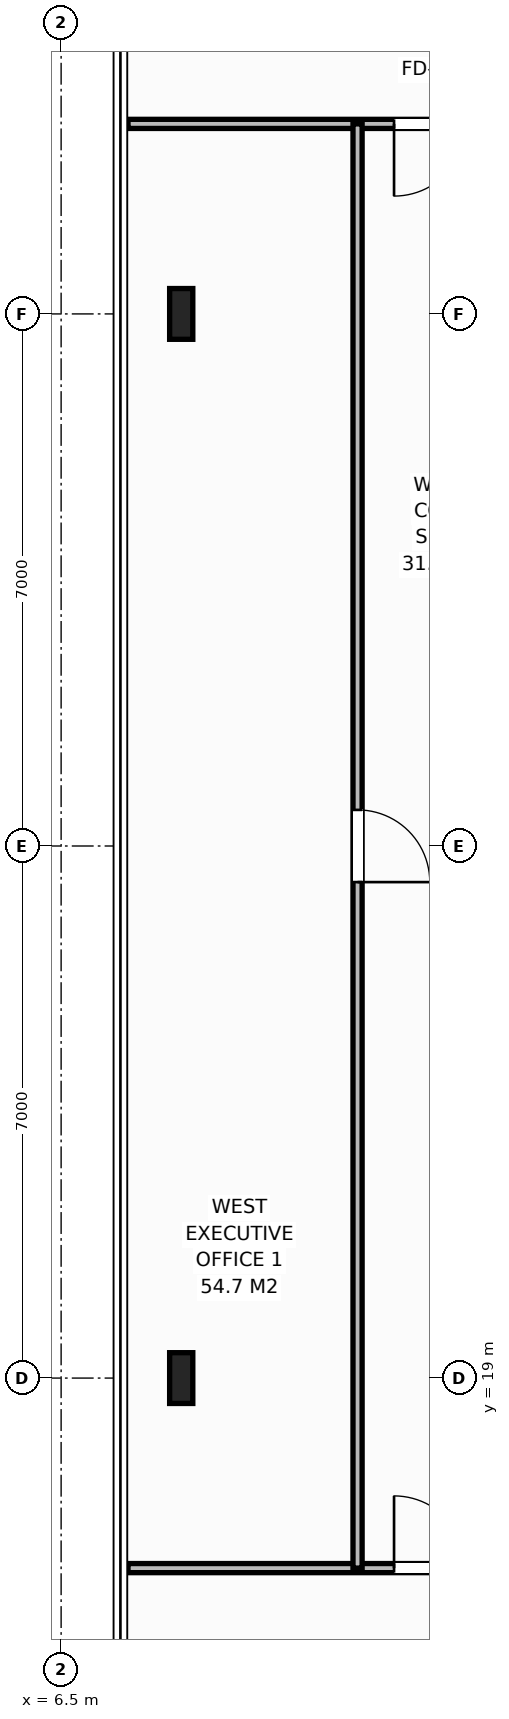
"""IFC4 building model, lengths in metres.
Left out: names, types, materials, properties, quantities, classifications, styles, units other than length and angle.
Written with IfcOpenShell. Run it as: python <this file> out.ifc"""

import sys

from ifc_helpers import new_model, si_unit, direction, frame, frame_2d, origin, origin_2d, place, context, subcontext, project, spatial, rectangle, i_section, extrude, element, fill, save


model = new_model("IFC4")
c1 = context("Model", 3, precision=1e-05, world=origin(), true_north=direction((0.0, 1.0)))
c2 = subcontext(c1, "Body", "Model", "MODEL_VIEW")
j1 = project(units=[si_unit("LENGTHUNIT", "METRE"), si_unit("PLANEANGLEUNIT", "RADIAN")], contexts=[c1])
p1 = place(None, origin())
s1 = spatial("IfcSite", under=j1, at=p1, CompositionType="ELEMENT")
p2 = place(p1, origin())
s2 = spatial("IfcBuilding", under=s1, at=p2, CompositionType="ELEMENT")
p3 = place(p2, frame((0.0, 0.0, 270.8)))
s3 = spatial("IfcBuildingStorey", under=s2, at=p3, CompositionType="ELEMENT", Elevation=270.8)
for number, where, z_axis, x_axis in (
    (1, (8.08, 19.0, 0.0), (0.0, 0.0, 1.0), (1.0, 0.0, 0.0)),
    (2, (8.08, 33.0, 0.0), (0.0, 0.0, 1.0), (1.0, 0.0, 0.0)),
):
    element("IfcColumn", number, at=place(p3, frame(where, z_axis=z_axis, x_axis=x_axis)), inside=s3, PredefinedType="COLUMN", context=c2, shape_type="SweptSolid", body=[
        extrude(i_section(OverallWidth=0.305, OverallDepth=0.668, WebThickness=0.021, FlangeThickness=0.04, at=origin_2d()), origin(), (0.0, 0.0, 1.0), 3.8),
    ])
p4 = place(p3, frame((7.38, 35.5, 0.0), z_axis=(0.0, 0.0, 1.0), x_axis=(1.0, 0.0, 0.0)))
e3 = element("IfcWall", 3, at=p4, inside=s3, PredefinedType="PARTITIONING", context=c2, shape_type="SweptSolid", body=[
    extrude(rectangle(XDim=10.121, YDim=0.12, at=frame_2d((5.061, 0.0))), origin(), (0.0, 0.0, 1.0), 3.588),
])
p5 = place(p4, frame((3.5, 0.0, 0.0)))
e4 = element("IfcOpeningElement", 4, at=p5, cuts=e3, PredefinedType="OPENING", context=c2, shape_type="SweptSolid", body=[
    extrude(rectangle(XDim=0.95, YDim=2.15, at=frame_2d((0.475, 1.075))), frame((0.0, 0.07, 0.0), z_axis=(0.0, -1.0, 0.0), x_axis=(1.0, 0.0, 0.0)), (0.0, 0.0, 1.0), 0.14),
])
p6 = place(p3, frame((7.38, 16.5, 0.0), z_axis=(0.0, 0.0, 1.0), x_axis=(1.0, 0.0, 0.0)))
e5 = element("IfcWall", 5, at=p6, inside=s3, PredefinedType="PARTITIONING", context=c2, shape_type="SweptSolid", body=[
    extrude(rectangle(XDim=5.76, YDim=0.12, at=frame_2d((2.88, 0.0))), origin(), (0.0, 0.0, 1.0), 3.588),
])
p7 = place(p6, frame((3.5, 0.0, 0.0)))
e6 = element("IfcOpeningElement", 6, at=p7, cuts=e5, PredefinedType="OPENING", context=c2, shape_type="SweptSolid", body=[
    extrude(rectangle(XDim=0.95, YDim=2.15, at=frame_2d((0.475, 1.075))), frame((0.0, 0.07, 0.0), z_axis=(0.0, -1.0, 0.0), x_axis=(1.0, 0.0, 0.0)), (0.0, 0.0, 1.0), 0.14),
])
p8 = place(p3, frame((10.4, 16.5, 0.0), z_axis=(0.0, 0.0, 1.0), x_axis=(0.0, 1.0, 0.0)))
e7 = element("IfcWall", 7, at=p8, inside=s3, PredefinedType="PARTITIONING", context=c2, shape_type="SweptSolid", body=[
    extrude(rectangle(XDim=19.0, YDim=0.12, at=frame_2d((9.5, 0.0))), origin(), (0.0, 0.0, 1.0), 3.588),
])
p9 = place(p8, frame((9.025, 0.0, 0.0)))
e8 = element("IfcOpeningElement", 8, at=p9, cuts=e7, PredefinedType="OPENING", context=c2, shape_type="SweptSolid", body=[
    extrude(rectangle(XDim=0.95, YDim=2.15, at=frame_2d((0.475, 1.075))), frame((0.0, 0.07, 0.0), z_axis=(0.0, -1.0, 0.0), x_axis=(1.0, 0.0, 0.0)), (0.0, 0.0, 1.0), 0.14),
])
p10 = place(p5, origin())
e9 = element("IfcDoor", 9, at=p10, inside=s3, OperationType="SINGLE_SWING_RIGHT", PredefinedType="DOOR", context=c2, shape_type="SweptSolid", body=[
    extrude(rectangle(XDim=0.95, YDim=2.15, at=frame_2d((0.475, 1.075))), frame((0.0, 0.025, 0.0), z_axis=(0.0, -1.0, 0.0), x_axis=(1.0, 0.0, 0.0)), (0.0, 0.0, 1.0), 0.05),
])
fill(e4, e9)
p11 = place(p7, origin())
e10 = element("IfcDoor", 10, at=p11, inside=s3, OperationType="SINGLE_SWING_LEFT", PredefinedType="DOOR", context=c2, shape_type="SweptSolid", body=[
    extrude(rectangle(XDim=0.95, YDim=2.15, at=frame_2d((0.475, 1.075))), frame((0.0, 0.025, 0.0), z_axis=(0.0, -1.0, 0.0), x_axis=(1.0, 0.0, 0.0)), (0.0, 0.0, 1.0), 0.05),
])
fill(e6, e10)
p12 = place(p9, origin())
e11 = element("IfcDoor", 11, at=p12, inside=s3, OperationType="SINGLE_SWING_RIGHT", PredefinedType="DOOR", context=c2, shape_type="SweptSolid", body=[
    extrude(rectangle(XDim=0.95, YDim=2.15, at=frame_2d((0.475, 1.075))), frame((0.0, 0.025, 0.0), z_axis=(0.0, -1.0, 0.0), x_axis=(1.0, 0.0, 0.0)), (0.0, 0.0, 1.0), 0.05),
])
fill(e8, e11)
save(model, sys.argv[1])
